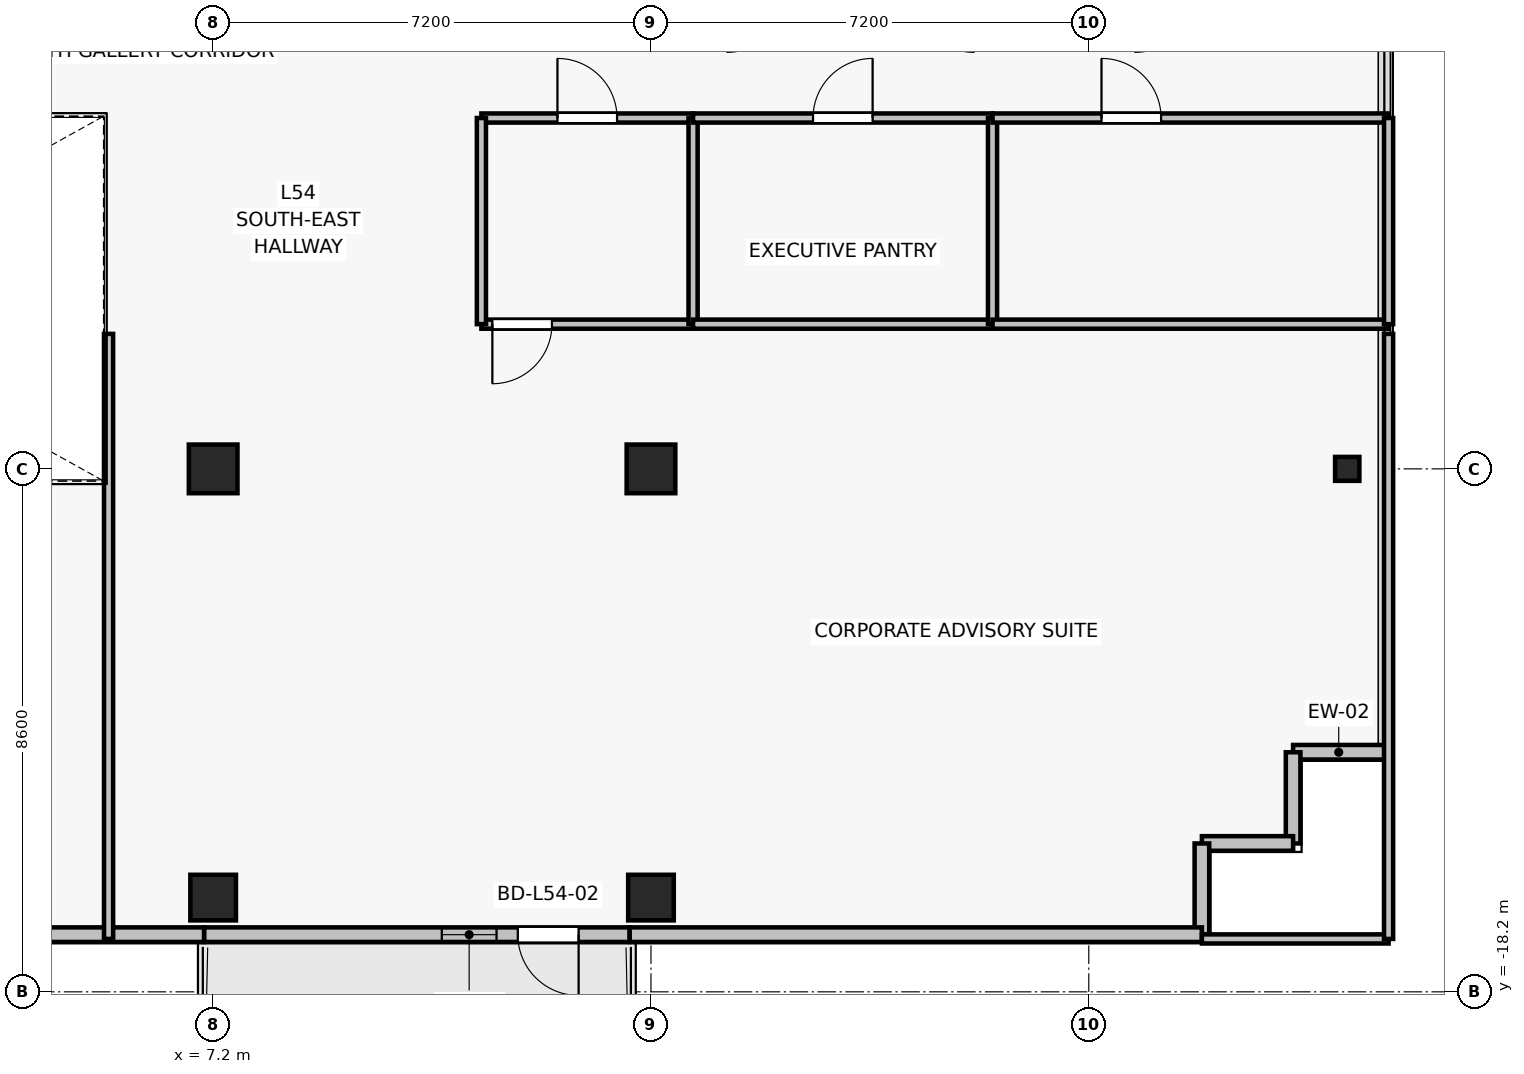
"""IFC4 building model, lengths in metres.
Left out: names, types, materials, properties, quantities, classifications, styles, units other than length and angle.
Written with IfcOpenShell. Run it as: python <this file> out.ifc"""

import sys

from ifc_helpers import new_model, si_unit, direction, frame, frame_2d, origin, origin_2d, place, context, subcontext, project, spatial, rectangle, i_section, extrude, source, transform, mapped, element, fill, save


model = new_model("IFC4")
c1 = context("Model", 3, precision=1e-05, world=origin(), true_north=direction((0.0, 1.0)))
c2 = subcontext(c1, "Body", "Model", "MODEL_VIEW")
j1 = project(units=[si_unit("LENGTHUNIT", "METRE"), si_unit("PLANEANGLEUNIT", "RADIAN")], contexts=[c1])
p1 = place(None, origin())
s1 = spatial("IfcSite", under=j1, at=p1, CompositionType="ELEMENT")
p2 = place(p1, origin())
s2 = spatial("IfcBuilding", under=s1, at=p2, CompositionType="ELEMENT")
p3 = place(p2, frame((0.0, 0.0, 192.4)))
s3 = spatial("IfcBuildingStorey", under=s2, at=p3, CompositionType="ELEMENT", Elevation=192.4)
for number, where, z_axis, x_axis in (
    (1, (7.2, -9.6, 0.0), (0.0, 0.0, 1.0), (1.0, 0.0, 0.0)),
    (2, (14.4, -9.6, 0.0), (0.0, 0.0, 1.0), (1.0, 0.0, 0.0)),
):
    element("IfcColumn", number, at=place(p3, frame(where, z_axis=z_axis, x_axis=x_axis)), inside=s3, PredefinedType="COLUMN", context=c2, shape_type="SweptSolid", body=[
        extrude(rectangle(XDim=0.8, YDim=0.8, at=origin_2d()), origin(), (0.0, 0.0, 1.0), 3.3),
    ])
for number, where, z_axis, x_axis in (
    (3, (7.2, -16.65, 0.0), (0.0, 0.0, 1.0), (1.0, 0.0, 0.0)),
    (4, (14.4, -16.65, 0.0), (0.0, 0.0, 1.0), (1.0, 0.0, 0.0)),
):
    element("IfcColumn", number, at=place(p3, frame(where, z_axis=z_axis, x_axis=x_axis)), inside=s3, PredefinedType="COLUMN", context=c2, shape_type="SweptSolid", body=[
        extrude(rectangle(XDim=0.75, YDim=0.75, at=origin_2d()), origin(), (0.0, 0.0, 1.0), 3.3),
    ])
p4 = place(p3, frame((25.85, -9.6, 0.0), z_axis=(0.0, 0.0, 1.0), x_axis=(1.0, 0.0, 0.0)))
e5 = element("IfcColumn", 5, at=p4, inside=s3, PredefinedType="COLUMN", context=c2, shape_type="SweptSolid", body=[
    extrude(i_section(OverallWidth=0.399, OverallDepth=0.394, WebThickness=0.023, FlangeThickness=0.037, FilletRadius=0.015, at=origin_2d()), origin(), (0.0, 0.0, 1.0), 3.3),
])
p5 = place(p3, frame((14.05, -17.26, 0.0), z_axis=(0.0, 0.0, 1.0), x_axis=(-1.0, 0.0, 0.0)))
e6 = element("IfcWall", 6, at=p5, inside=s3, PredefinedType="SOLIDWALL", context=c2, shape_type="SweptSolid", body=[
    extrude(rectangle(XDim=7.0, YDim=0.24, at=frame_2d((3.5, 0.0))), origin(), (0.0, 0.0, 1.0), 2.665),
])
p6 = place(p5, frame((0.84, 0.0, 0.0)))
e7 = element("IfcOpeningElement", 7, at=p6, cuts=e6, PredefinedType="OPENING", context=c2, shape_type="SweptSolid", body=[
    extrude(rectangle(XDim=1.0, YDim=2.2, at=frame_2d((0.5, 1.1))), frame((0.0, 0.13, 0.0), z_axis=(0.0, -1.0, 0.0), x_axis=(1.0, 0.0, 0.0)), (0.0, 0.0, 1.0), 0.26),
])
p7 = place(p5, frame((2.19, 0.0, 0.85)))
e8 = element("IfcOpeningElement", 8, at=p7, cuts=e6, PredefinedType="OPENING", context=c2, shape_type="SweptSolid", body=[
    extrude(rectangle(XDim=0.9, YDim=1.35, at=frame_2d((0.45, 0.675))), frame((0.0, 0.13, 0.0), z_axis=(0.0, -1.0, 0.0), x_axis=(1.0, 0.0, 0.0)), (0.0, 0.0, 1.0), 0.26),
])
for number, where, z_axis, x_axis in (
    (9, (24.96, -14.26, 0.0), (0.0, 0.0, 1.0), (1.0, 0.0, 0.0)),
    (10, (24.96, -15.76, 0.0), (0.0, 0.0, 1.0), (0.0, 1.0, 0.0)),
    (11, (23.46, -15.76, 0.0), (0.0, 0.0, 1.0), (1.0, 0.0, 0.0)),
    (12, (23.46, -17.26, 0.0), (0.0, 0.0, 1.0), (0.0, 1.0, 0.0)),
):
    element("IfcWall", number, at=place(p3, frame(where, z_axis=z_axis, x_axis=x_axis)), inside=s3, PredefinedType="SOLIDWALL", context=c2, shape_type="SweptSolid", body=[
        extrude(rectangle(XDim=1.5, YDim=0.24, at=frame_2d((0.75, 0.0))), origin(), (0.0, 0.0, 1.0), 3.075),
    ])
p8 = place(p3, frame((14.05, -17.26, 0.0), z_axis=(0.0, 0.0, 1.0), x_axis=(1.0, 0.0, 0.0)))
e13 = element("IfcWall", 13, at=p8, inside=s3, PredefinedType="SOLIDWALL", context=c2, shape_type="SweptSolid", body=[
    extrude(rectangle(XDim=9.41, YDim=0.24, at=frame_2d((4.705, 0.0))), origin(), (0.0, 0.0, 1.0), 3.075),
])
p9 = place(p3, frame((3.2, -17.26, 0.0), z_axis=(0.0, 0.0, 1.0), x_axis=(1.0, 0.0, 0.0)))
e14 = element("IfcWall", 14, at=p9, inside=s3, PredefinedType="SOLIDWALL", context=c2, shape_type="SweptSolid", body=[
    extrude(rectangle(XDim=3.85, YDim=0.24, at=frame_2d((1.925, 0.0))), origin(), (0.0, 0.0, 1.0), 3.075),
])
p10 = place(p3, frame((15.092, -7.22, 0.0), z_axis=(0.0, 0.0, 1.0), x_axis=(-1.0, 0.0, 0.0)))
e15 = element("IfcWall", 15, at=p10, inside=s3, PredefinedType="PARTITIONING", context=c2, shape_type="SweptSolid", body=[
    extrude(rectangle(XDim=3.481, YDim=0.15, at=frame_2d((1.74, 0.0))), origin(), (0.0, 0.0, 1.0), 2.565),
])
p11 = place(p10, frame((2.321, 0.0, 0.0)))
e16 = element("IfcOpeningElement", 16, at=p11, cuts=e15, PredefinedType="OPENING", context=c2, shape_type="SweptSolid", body=[
    extrude(rectangle(XDim=0.98, YDim=2.15, at=frame_2d((0.49, 1.075))), frame((0.0, 0.085, 0.0), z_axis=(0.0, -1.0, 0.0), x_axis=(1.0, 0.0, 0.0)), (0.0, 0.0, 1.0), 0.17),
])
p12 = place(p3, frame((11.611, -3.83, 0.0), z_axis=(0.0, 0.0, 1.0), x_axis=(1.0, 0.0, 0.0)))
e17 = element("IfcWall", 17, at=p12, inside=s3, PredefinedType="PARTITIONING", context=c2, shape_type="SweptSolid", body=[
    extrude(rectangle(XDim=3.481, YDim=0.15, at=frame_2d((1.74, 0.0))), origin(), (0.0, 0.0, 1.0), 2.565),
])
p13 = place(p12, frame((1.25, 0.0, 0.0)))
e18 = element("IfcOpeningElement", 18, at=p13, cuts=e17, PredefinedType="OPENING", context=c2, shape_type="SweptSolid", body=[
    extrude(rectangle(XDim=0.98, YDim=2.15, at=frame_2d((0.49, 1.075))), frame((0.0, 0.085, 0.0), z_axis=(0.0, -1.0, 0.0), x_axis=(1.0, 0.0, 0.0)), (0.0, 0.0, 1.0), 0.17),
])
p14 = place(p3, frame((11.611, -7.22, 0.0), z_axis=(0.0, 0.0, 1.0), x_axis=(0.0, 1.0, 0.0)))
e19 = element("IfcWall", 19, at=p14, inside=s3, PredefinedType="PARTITIONING", context=c2, shape_type="SweptSolid", body=[
    extrude(rectangle(XDim=3.39, YDim=0.15, at=frame_2d((1.695, 0.0))), origin(), (0.0, 0.0, 1.0), 2.665),
])
p15 = place(p3, frame((15.092, -3.83, 0.0), z_axis=(0.0, 0.0, 1.0), x_axis=(0.0, -1.0, 0.0)))
e20 = element("IfcWall", 20, at=p15, inside=s3, PredefinedType="PARTITIONING", context=c2, shape_type="SweptSolid", body=[
    extrude(rectangle(XDim=3.39, YDim=0.15, at=frame_2d((1.695, 0.0))), origin(), (0.0, 0.0, 1.0), 3.075),
])
p16 = place(p3, frame((20.017, -7.22, 0.0), z_axis=(0.0, 0.0, 1.0), x_axis=(-1.0, 0.0, 0.0)))
e21 = element("IfcWall", 21, at=p16, inside=s3, PredefinedType="PARTITIONING", context=c2, shape_type="SweptSolid", body=[
    extrude(rectangle(XDim=4.925, YDim=0.15, at=frame_2d((2.462, 0.0))), origin(), (0.0, 0.0, 1.0), 3.075),
])
p17 = place(p3, frame((15.092, -3.83, 0.0), z_axis=(0.0, 0.0, 1.0), x_axis=(1.0, 0.0, 0.0)))
e22 = element("IfcWall", 22, at=p17, inside=s3, PredefinedType="PARTITIONING", context=c2, shape_type="SweptSolid", body=[
    extrude(rectangle(XDim=4.925, YDim=0.15, at=frame_2d((2.462, 0.0))), origin(), (0.0, 0.0, 1.0), 3.075),
])
p18 = place(p17, frame((1.973, 0.0, 0.0)))
e23 = element("IfcOpeningElement", 23, at=p18, cuts=e22, PredefinedType="OPENING", context=c2, shape_type="SweptSolid", body=[
    extrude(rectangle(XDim=0.98, YDim=2.15, at=frame_2d((0.49, 1.075))), frame((0.0, 0.085, 0.0), z_axis=(0.0, -1.0, 0.0), x_axis=(1.0, 0.0, 0.0)), (0.0, 0.0, 1.0), 0.17),
])
p19 = place(p3, frame((20.017, -3.83, 0.0), z_axis=(0.0, 0.0, 1.0), x_axis=(0.0, -1.0, 0.0)))
e24 = element("IfcWall", 24, at=p19, inside=s3, PredefinedType="PARTITIONING", context=c2, shape_type="SweptSolid", body=[
    extrude(rectangle(XDim=3.39, YDim=0.15, at=frame_2d((1.695, 0.0))), origin(), (0.0, 0.0, 1.0), 3.075),
])
p20 = place(p3, frame((26.53, -7.22, 0.0), z_axis=(0.0, 0.0, 1.0), x_axis=(-1.0, 0.0, 0.0)))
e25 = element("IfcWall", 25, at=p20, inside=s3, PredefinedType="PARTITIONING", context=c2, shape_type="SweptSolid", body=[
    extrude(rectangle(XDim=6.513, YDim=0.15, at=frame_2d((3.256, 0.0))), origin(), (0.0, 0.0, 1.0), 2.565),
])
p21 = place(p3, frame((20.017, -3.83, 0.0), z_axis=(0.0, 0.0, 1.0), x_axis=(1.0, 0.0, 0.0)))
e26 = element("IfcWall", 26, at=p21, inside=s3, PredefinedType="PARTITIONING", context=c2, shape_type="SweptSolid", body=[
    extrude(rectangle(XDim=6.513, YDim=0.15, at=frame_2d((3.256, 0.0))), origin(), (0.0, 0.0, 1.0), 2.565),
])
p22 = place(p21, frame((1.792, 0.0, 0.0)))
e27 = element("IfcOpeningElement", 27, at=p22, cuts=e26, PredefinedType="OPENING", context=c2, shape_type="SweptSolid", body=[
    extrude(rectangle(XDim=0.98, YDim=2.15, at=frame_2d((0.49, 1.075))), frame((0.0, 0.085, 0.0), z_axis=(0.0, -1.0, 0.0), x_axis=(1.0, 0.0, 0.0)), (0.0, 0.0, 1.0), 0.17),
])
p23 = place(p3, frame((26.53, -3.83, 0.0), z_axis=(0.0, 0.0, 1.0), x_axis=(0.0, -1.0, 0.0)))
e28 = element("IfcWall", 28, at=p23, inside=s3, PredefinedType="PARTITIONING", context=c2, shape_type="SweptSolid", body=[
    extrude(rectangle(XDim=3.39, YDim=0.15, at=frame_2d((1.695, 0.0))), origin(), (0.0, 0.0, 1.0), 3.075),
])
p24 = place(p3, frame((26.53, -17.33, 0.0), z_axis=(0.0, 0.0, 1.0), x_axis=(-1.0, 0.0, 0.0)))
e29 = element("IfcWall", 29, at=p24, inside=s3, PredefinedType="PARTITIONING", context=c2, shape_type="SweptSolid", body=[
    extrude(rectangle(XDim=3.07, YDim=0.15, at=frame_2d((1.535, 0.0))), origin(), (0.0, 0.0, 1.0), 2.665),
])
p25 = place(p3, frame((5.48, -17.33, 0.0), z_axis=(0.0, 0.0, 1.0), x_axis=(0.0, 1.0, 0.0)))
e30 = element("IfcWall", 30, at=p25, inside=s3, PredefinedType="PARTITIONING", context=c2, shape_type="SweptSolid", body=[
    extrude(rectangle(XDim=9.95, YDim=0.15, at=frame_2d((4.975, 0.0))), origin(), (0.0, 0.0, 1.0), 2.565),
])
p26 = place(p3, frame((26.53, -7.38, 0.0), z_axis=(0.0, 0.0, 1.0), x_axis=(0.0, -1.0, 0.0)))
e31 = element("IfcWall", 31, at=p26, inside=s3, PredefinedType="PARTITIONING", context=c2, shape_type="SweptSolid", body=[
    extrude(rectangle(XDim=9.95, YDim=0.15, at=frame_2d((4.975, 0.0))), origin(), (0.0, 0.0, 1.0), 2.665),
])
m1 = source(origin(), c2, "Body", "SweptSolid", [
    extrude(rectangle(XDim=1.0, YDim=2.2, at=frame_2d((0.5, 1.1))), frame((0.0, 0.025, 0.0), z_axis=(0.0, -1.0, 0.0), x_axis=(1.0, 0.0, 0.0)), (0.0, 0.0, 1.0), 0.05),
])
p27 = place(p6, origin())
e32 = element("IfcDoor", 32, at=p27, inside=s3, OperationType="SINGLE_SWING_LEFT", PredefinedType="DOOR", context=c2, shape_type="MappedRepresentation", body=[
    mapped(m1, transform((0.0, 0.0, 0.0), x_axis=(1.0, 0.0, 0.0), y_axis=(0.0, 1.0, 0.0), z_axis=(0.0, 0.0, 1.0), scale=1.0)),
])
fill(e7, e32)
m2 = source(origin(), c2, "Body", "SweptSolid", [
    extrude(rectangle(XDim=0.9, YDim=1.35, at=frame_2d((0.45, 0.675))), frame((0.0, 0.03, 0.0), z_axis=(0.0, -1.0, 0.0), x_axis=(1.0, 0.0, 0.0)), (0.0, 0.0, 1.0), 0.06),
])
p28 = place(p7, origin())
e33 = element("IfcWindow", 33, at=p28, inside=s3, PartitioningType="SINGLE_PANEL", PredefinedType="WINDOW", context=c2, shape_type="MappedRepresentation", body=[
    mapped(m2, transform((0.0, 0.0, 0.0), x_axis=(1.0, 0.0, 0.0), y_axis=(0.0, 1.0, 0.0), z_axis=(0.0, 0.0, 1.0), scale=1.0)),
])
fill(e8, e33)
m3 = source(origin(), c2, "Body", "SweptSolid", [
    extrude(rectangle(XDim=0.98, YDim=2.15, at=frame_2d((0.49, 1.075))), frame((0.0, 0.025, 0.0), z_axis=(0.0, -1.0, 0.0), x_axis=(1.0, 0.0, 0.0)), (0.0, 0.0, 1.0), 0.05),
])
p29 = place(p13, origin())
e34 = element("IfcDoor", 34, at=p29, inside=s3, OperationType="SINGLE_SWING_LEFT", PredefinedType="DOOR", context=c2, shape_type="MappedRepresentation", body=[
    mapped(m3, transform((0.0, 0.0, 0.0), x_axis=(1.0, 0.0, 0.0), y_axis=(0.0, 1.0, 0.0), z_axis=(0.0, 0.0, 1.0), scale=1.0)),
])
fill(e18, e34)
p30 = place(p18, origin())
e35 = element("IfcDoor", 35, at=p30, inside=s3, OperationType="SINGLE_SWING_RIGHT", PredefinedType="DOOR", context=c2, shape_type="MappedRepresentation", body=[
    mapped(m3, transform((0.0, 0.0, 0.0), x_axis=(1.0, 0.0, 0.0), y_axis=(0.0, 1.0, 0.0), z_axis=(0.0, 0.0, 1.0), scale=1.0)),
])
fill(e23, e35)
p31 = place(p22, origin())
e36 = element("IfcDoor", 36, at=p31, inside=s3, OperationType="SINGLE_SWING_LEFT", PredefinedType="DOOR", context=c2, shape_type="MappedRepresentation", body=[
    mapped(m3, transform((0.0, 0.0, 0.0), x_axis=(1.0, 0.0, 0.0), y_axis=(0.0, 1.0, 0.0), z_axis=(0.0, 0.0, 1.0), scale=1.0)),
])
fill(e27, e36)
p32 = place(p11, origin())
e37 = element("IfcDoor", 37, at=p32, inside=s3, OperationType="SINGLE_SWING_RIGHT", PredefinedType="DOOR", context=c2, shape_type="MappedRepresentation", body=[
    mapped(m3, transform((0.0, 0.0, 0.0), x_axis=(1.0, 0.0, 0.0), y_axis=(0.0, 1.0, 0.0), z_axis=(0.0, 0.0, 1.0), scale=1.0)),
])
fill(e16, e37)
save(model, sys.argv[1])
